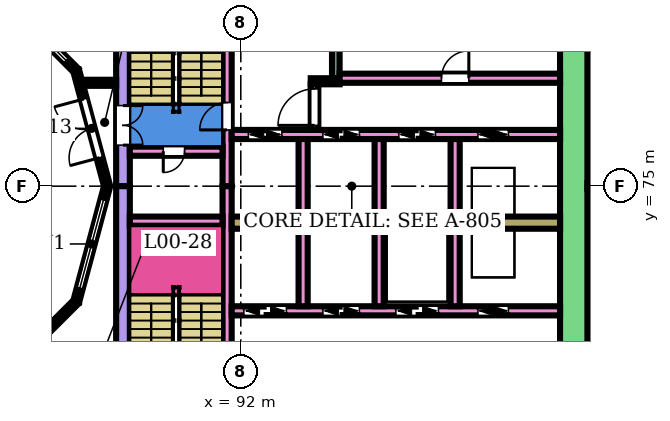
"""IFC4 building model, lengths in metres.
Left out: names, types, materials, properties, quantities, classifications, styles, units other than length and angle.
Written with IfcOpenShell. Run it as: python <this file> out.ifc"""

import sys

from ifc_helpers import new_model, si_unit, direction, frame, frame_2d, origin, place, context, subcontext, project, spatial, rectangle, extrude, element, fill, save


model = new_model("IFC4")
c1 = context("Model", 3, precision=1e-05, world=origin(), true_north=direction((0.0, 1.0)))
c2 = subcontext(c1, "Body", "Model", "MODEL_VIEW")
j1 = project(units=[si_unit("LENGTHUNIT", "METRE"), si_unit("PLANEANGLEUNIT", "RADIAN")], contexts=[c1])
p1 = place(None, origin())
s1 = spatial("IfcSite", under=j1, at=p1, CompositionType="ELEMENT")
p2 = place(p1, origin())
s2 = spatial("IfcBuilding", under=s1, at=p2, CompositionType="ELEMENT")
p3 = place(p2, origin())
s3 = spatial("IfcBuildingStorey", under=s2, at=p3, CompositionType="ELEMENT", Elevation=0.0)
p4 = place(p3, frame((88.125, 75.0, 0.0), z_axis=(0.0, 0.0, 1.0), x_axis=(0.0, 1.0, 0.0)))
e1 = element("IfcWall", 1, at=p4, inside=s3, PredefinedType="SHEAR", context=c2, shape_type="SweptSolid", body=[
    extrude(rectangle(XDim=7.5, YDim=0.45, at=frame_2d((3.75, 0.0))), origin(), (0.0, 0.0, 1.0), 6.55),
])
p5 = place(p4, frame((1.35, 0.0, 0.0)))
e2 = element("IfcOpeningElement", 2, at=p5, cuts=e1, PredefinedType="OPENING", context=c2, shape_type="SweptSolid", body=[
    extrude(rectangle(XDim=1.3, YDim=2.4, at=frame_2d((0.65, 1.2))), frame((0.0, 0.235, 0.0), z_axis=(0.0, -1.0, 0.0), x_axis=(1.0, 0.0, 0.0)), (0.0, 0.0, 1.0), 0.47),
])
p6 = place(p3, frame((88.125, 67.5, 0.0), z_axis=(0.0, 0.0, 1.0), x_axis=(0.0, 1.0, 0.0)))
e3 = element("IfcWall", 3, at=p6, inside=s3, PredefinedType="SHEAR", context=c2, shape_type="SweptSolid", body=[
    extrude(rectangle(XDim=7.5, YDim=0.45, at=frame_2d((3.75, 0.0))), origin(), (0.0, 0.0, 1.0), 6.55),
])
p7 = place(p6, frame((0.05, 0.0, 0.0)))
e4 = element("IfcOpeningElement", 4, at=p7, cuts=e3, PredefinedType="OPENING", context=c2, shape_type="SweptSolid", body=[
    extrude(rectangle(XDim=1.3, YDim=2.4, at=frame_2d((0.65, 1.2))), frame((0.0, 0.235, 0.0), z_axis=(0.0, -1.0, 0.0), x_axis=(1.0, 0.0, 0.0)), (0.0, 0.0, 1.0), 0.47),
])
p8 = place(p3, frame((102.95, 66.6, 0.0), z_axis=(0.0, 0.0, 1.0), x_axis=(0.0, 1.0, 0.0)))
e5 = element("IfcWall", 5, at=p8, inside=s3, PredefinedType="SHEAR", context=c2, shape_type="SweptSolid", body=[
    extrude(rectangle(XDim=16.8, YDim=0.9, at=frame_2d((8.4, 0.0))), origin(), (0.0, 0.0, 1.0), 6.55),
])
p9 = place(p3, frame((91.55, 75.0, 0.0), z_axis=(0.0, 0.0, 1.0), x_axis=(0.0, 1.0, 0.0)))
e6 = element("IfcWall", 6, at=p9, inside=s3, PredefinedType="SHEAR", context=c2, shape_type="SweptSolid", body=[
    extrude(rectangle(XDim=7.5, YDim=0.3, at=frame_2d((3.75, 0.0))), origin(), (0.0, 0.0, 1.0), 6.55),
])
p10 = place(p9, frame((1.85, 0.0, 0.0)))
e7 = element("IfcOpeningElement", 7, at=p10, cuts=e6, PredefinedType="OPENING", context=c2, shape_type="SweptSolid", body=[
    extrude(rectangle(XDim=0.9, YDim=2.1, at=frame_2d((0.45, 1.05))), frame((0.0, 0.16, 0.0), z_axis=(0.0, -1.0, 0.0), x_axis=(1.0, 0.0, 0.0)), (0.0, 0.0, 1.0), 0.32),
])
p11 = place(p3, frame((91.55, 67.5, 0.0), z_axis=(0.0, 0.0, 1.0), x_axis=(0.0, 1.0, 0.0)))
e8 = element("IfcWall", 8, at=p11, inside=s3, PredefinedType="SHEAR", context=c2, shape_type="SweptSolid", body=[
    extrude(rectangle(XDim=7.5, YDim=0.3, at=frame_2d((3.75, 0.0))), origin(), (0.0, 0.0, 1.0), 6.55),
])
p12 = place(p11, frame((0.15, 0.0, 0.0)))
e9 = element("IfcOpeningElement", 9, at=p12, cuts=e8, PredefinedType="OPENING", context=c2, shape_type="SweptSolid", body=[
    extrude(rectangle(XDim=0.9, YDim=2.1, at=frame_2d((0.45, 1.05))), frame((0.0, 0.16, 0.0), z_axis=(0.0, -1.0, 0.0), x_axis=(1.0, 0.0, 0.0)), (0.0, 0.0, 1.0), 0.32),
])
p13 = place(p3, frame((88.35, 76.15, 0.0), z_axis=(0.0, 0.0, 1.0), x_axis=(1.0, 0.0, 0.0)))
e10 = element("IfcWall", 10, at=p13, inside=s3, PredefinedType="SHEAR", context=c2, shape_type="SweptSolid", body=[
    extrude(rectangle(XDim=3.05, YDim=0.3, at=frame_2d((1.525, 0.0))), origin(), (0.0, 0.0, 1.0), 6.55),
])
p14 = place(p13, frame((1.1, 0.0, 0.0)))
e11 = element("IfcOpeningElement", 11, at=p14, cuts=e10, PredefinedType="OPENING", context=c2, shape_type="SweptSolid", body=[
    extrude(rectangle(XDim=0.7, YDim=2.0, at=frame_2d((0.35, 1.0))), frame((0.0, 0.16, 0.0), z_axis=(0.0, -1.0, 0.0), x_axis=(1.0, 0.0, 0.0)), (0.0, 0.0, 1.0), 0.32),
])
p15 = place(p3, frame((88.35, 73.85, 0.0), z_axis=(0.0, 0.0, 1.0), x_axis=(1.0, 0.0, 0.0)))
e12 = element("IfcWall", 12, at=p15, inside=s3, PredefinedType="SHEAR", context=c2, shape_type="SweptSolid", body=[
    extrude(rectangle(XDim=3.05, YDim=0.3, at=frame_2d((1.525, 0.0))), origin(), (0.0, 0.0, 1.0), 6.55),
])
p16 = place(p3, frame((91.7, 76.7, 0.0), z_axis=(0.0, 0.0, 1.0), x_axis=(1.0, 0.0, 0.0)))
e13 = element("IfcWall", 13, at=p16, inside=s3, PredefinedType="SHEAR", context=c2, shape_type="SweptSolid", body=[
    extrude(rectangle(XDim=10.8, YDim=0.3, at=frame_2d((5.4, 0.0))), origin(), (0.0, 0.0, 1.0), 6.55),
])
p17 = place(p16, frame((0.55, 0.0, 0.0)))
e14 = element("IfcOpeningElement", 14, at=p17, cuts=e13, PredefinedType="OPENING", context=c2, shape_type="SweptSolid", body=[
    extrude(rectangle(XDim=1.1, YDim=2.1, at=frame_2d((0.55, 1.05))), frame((0.0, 0.16, 0.0), z_axis=(0.0, -1.0, 0.0), x_axis=(1.0, 0.0, 0.0)), (0.0, 0.0, 1.0), 0.32),
])
p18 = place(p16, frame((3.0, 0.0, 0.0)))
e15 = element("IfcOpeningElement", 15, at=p18, cuts=e13, PredefinedType="OPENING", context=c2, shape_type="SweptSolid", body=[
    extrude(rectangle(XDim=1.2, YDim=2.1, at=frame_2d((0.6, 1.05))), frame((0.0, 0.16, 0.0), z_axis=(0.0, -1.0, 0.0), x_axis=(1.0, 0.0, 0.0)), (0.0, 0.0, 1.0), 0.32),
])
p19 = place(p16, frame((5.5, 0.0, 0.0)))
e16 = element("IfcOpeningElement", 16, at=p19, cuts=e13, PredefinedType="OPENING", context=c2, shape_type="SweptSolid", body=[
    extrude(rectangle(XDim=1.2, YDim=2.1, at=frame_2d((0.6, 1.05))), frame((0.0, 0.16, 0.0), z_axis=(0.0, -1.0, 0.0), x_axis=(1.0, 0.0, 0.0)), (0.0, 0.0, 1.0), 0.32),
])
p20 = place(p16, frame((8.1, 0.0, 0.0)))
e17 = element("IfcOpeningElement", 17, at=p20, cuts=e13, PredefinedType="OPENING", context=c2, shape_type="SweptSolid", body=[
    extrude(rectangle(XDim=1.0, YDim=2.1, at=frame_2d((0.5, 1.05))), frame((0.0, 0.16, 0.0), z_axis=(0.0, -1.0, 0.0), x_axis=(1.0, 0.0, 0.0)), (0.0, 0.0, 1.0), 0.32),
])
p21 = place(p3, frame((91.7, 73.8, 0.0), z_axis=(0.0, 0.0, 1.0), x_axis=(1.0, 0.0, 0.0)))
e18 = element("IfcWall", 18, at=p21, inside=s3, PredefinedType="SHEAR", context=c2, shape_type="SweptSolid", body=[
    extrude(rectangle(XDim=10.8, YDim=0.4, at=frame_2d((5.4, 0.0))), origin(), (0.0, 0.0, 1.0), 6.55),
])
p22 = place(p3, frame((91.7, 70.9, 0.0), z_axis=(0.0, 0.0, 1.0), x_axis=(1.0, 0.0, 0.0)))
e19 = element("IfcWall", 19, at=p22, inside=s3, PredefinedType="SHEAR", context=c2, shape_type="SweptSolid", body=[
    extrude(rectangle(XDim=10.8, YDim=0.3, at=frame_2d((5.4, 0.0))), origin(), (0.0, 0.0, 1.0), 6.55),
])
p23 = place(p22, frame((0.4, 0.0, 0.0)))
e20 = element("IfcOpeningElement", 20, at=p23, cuts=e19, PredefinedType="OPENING", context=c2, shape_type="SweptSolid", body=[
    extrude(rectangle(XDim=1.4, YDim=2.1, at=frame_2d((0.7, 1.05))), frame((0.0, 0.16, 0.0), z_axis=(0.0, -1.0, 0.0), x_axis=(1.0, 0.0, 0.0)), (0.0, 0.0, 1.0), 0.32),
])
p24 = place(p22, frame((3.0, 0.0, 0.0)))
e21 = element("IfcOpeningElement", 21, at=p24, cuts=e19, PredefinedType="OPENING", context=c2, shape_type="SweptSolid", body=[
    extrude(rectangle(XDim=1.2, YDim=2.1, at=frame_2d((0.6, 1.05))), frame((0.0, 0.16, 0.0), z_axis=(0.0, -1.0, 0.0), x_axis=(1.0, 0.0, 0.0)), (0.0, 0.0, 1.0), 0.32),
])
p25 = place(p22, frame((5.4, 0.0, 0.0)))
e22 = element("IfcOpeningElement", 22, at=p25, cuts=e19, PredefinedType="OPENING", context=c2, shape_type="SweptSolid", body=[
    extrude(rectangle(XDim=1.4, YDim=2.1, at=frame_2d((0.7, 1.05))), frame((0.0, 0.16, 0.0), z_axis=(0.0, -1.0, 0.0), x_axis=(1.0, 0.0, 0.0)), (0.0, 0.0, 1.0), 0.32),
])
p26 = place(p22, frame((8.1, 0.0, 0.0)))
e23 = element("IfcOpeningElement", 23, at=p26, cuts=e19, PredefinedType="OPENING", context=c2, shape_type="SweptSolid", body=[
    extrude(rectangle(XDim=1.0, YDim=2.1, at=frame_2d((0.5, 1.05))), frame((0.0, 0.16, 0.0), z_axis=(0.0, -1.0, 0.0), x_axis=(1.0, 0.0, 0.0)), (0.0, 0.0, 1.0), 0.32),
])
for number, where, z_axis, x_axis in (
    (24, (94.05, 74.0, 0.0), (0.0, 0.0, 1.0), (0.0, 1.0, 0.0)),
    (25, (96.55, 74.0, 0.0), (0.0, 0.0, 1.0), (0.0, 1.0, 0.0)),
    (26, (99.05, 74.0, 0.0), (0.0, 0.0, 1.0), (0.0, 1.0, 0.0)),
    (27, (94.05, 71.05, 0.0), (0.0, 0.0, 1.0), (0.0, 1.0, 0.0)),
    (28, (96.55, 71.05, 0.0), (0.0, 0.0, 1.0), (0.0, 1.0, 0.0)),
    (29, (99.05, 71.05, 0.0), (0.0, 0.0, 1.0), (0.0, 1.0, 0.0)),
):
    element("IfcWall", number, at=place(p3, frame(where, z_axis=z_axis, x_axis=x_axis)), inside=s3, PredefinedType="SHEAR", context=c2, shape_type="SweptSolid", body=[
        extrude(rectangle(XDim=2.55, YDim=0.3, at=frame_2d((1.275, 0.0))), origin(), (0.0, 0.0, 1.0), 6.55),
    ])
p27 = place(p3, frame((95.125, 78.55, 0.0), z_axis=(0.0, 0.0, 1.0), x_axis=(0.0, 1.0, 0.0)))
e30 = element("IfcWall", 30, at=p27, inside=s3, PredefinedType="SHEAR", context=c2, shape_type="SweptSolid", body=[
    extrude(rectangle(XDim=3.95, YDim=0.25, at=frame_2d((1.975, 0.0))), origin(), (0.0, 0.0, 1.0), 6.55),
])
p28 = place(p3, frame((94.3, 78.45, 0.0), z_axis=(0.0, 0.0, 1.0), x_axis=(1.0, 0.0, 0.0)))
e31 = element("IfcWall", 31, at=p28, inside=s3, PredefinedType="SHEAR", context=c2, shape_type="SweptSolid", body=[
    extrude(rectangle(XDim=0.95, YDim=0.2, at=frame_2d((0.475, 0.0))), origin(), (0.0, 0.0, 1.0), 6.55),
])
p29 = place(p3, frame((94.425, 76.85, 0.0), z_axis=(0.0, 0.0, 1.0), x_axis=(0.0, 1.0, 0.0)))
e32 = element("IfcWall", 32, at=p29, inside=s3, PredefinedType="SHEAR", context=c2, shape_type="SweptSolid", body=[
    extrude(rectangle(XDim=1.5, YDim=0.25, at=frame_2d((0.75, 0.0))), origin(), (0.0, 0.0, 1.0), 6.55),
])
p30 = place(p29, frame((0.15, 0.0, 0.0)))
e33 = element("IfcOpeningElement", 33, at=p30, cuts=e32, PredefinedType="OPENING", context=c2, shape_type="SweptSolid", body=[
    extrude(rectangle(XDim=1.2, YDim=2.1, at=frame_2d((0.6, 1.05))), frame((0.0, 0.135, 0.0), z_axis=(0.0, -1.0, 0.0), x_axis=(1.0, 0.0, 0.0)), (0.0, 0.0, 1.0), 0.27),
])
p31 = place(p3, frame((95.25, 78.55, 0.0), z_axis=(0.0, 0.0, 1.0), x_axis=(1.0, 0.0, 0.0)))
e34 = element("IfcWall", 34, at=p31, inside=s3, PredefinedType="SHEAR", context=c2, shape_type="SweptSolid", body=[
    extrude(rectangle(XDim=7.25, YDim=0.3, at=frame_2d((3.625, 0.0))), origin(), (0.0, 0.0, 1.0), 6.55),
])
p32 = place(p31, frame((3.35, 0.0, 0.0)))
e35 = element("IfcOpeningElement", 35, at=p32, cuts=e34, PredefinedType="OPENING", context=c2, shape_type="SweptSolid", body=[
    extrude(rectangle(XDim=0.9, YDim=2.1, at=frame_2d((0.45, 1.05))), frame((0.0, 0.16, 0.0), z_axis=(0.0, -1.0, 0.0), x_axis=(1.0, 0.0, 0.0)), (0.0, 0.0, 1.0), 0.32),
])
p33 = place(p3, frame((87.604, 75.0, 0.0), z_axis=(0.0, 0.0, 1.0), x_axis=(-0.258789828301, 0.965933654434, 0.0)))
e36 = element("IfcWall", 36, at=p33, inside=s3, PredefinedType="NOTDEFINED", context=c2, shape_type="SweptSolid", body=[
    extrude(rectangle(XDim=3.936, YDim=0.2, at=frame_2d((1.968, 0.0))), origin(), (0.0, 0.0, 1.0), 7.0),
])
p34 = place(p33, frame((0.968, 0.0, 0.0)))
e37 = element("IfcOpeningElement", 37, at=p34, cuts=e36, PredefinedType="OPENING", context=c2, shape_type="SweptSolid", body=[
    extrude(rectangle(XDim=2.0, YDim=2.4, at=frame_2d((1.0, 1.2))), frame((0.0, 0.11, 0.0), z_axis=(0.0, -1.0, 0.0), x_axis=(1.0, 0.0, 0.0)), (0.0, 0.0, 1.0), 0.22),
])
p35 = place(p3, frame((86.585, 78.802, 0.0), z_axis=(0.0, 0.0, 1.0), x_axis=(-0.707106781187, 0.707106781187, 0.0)))
e38 = element("IfcWall", 38, at=p35, inside=s3, PredefinedType="NOTDEFINED", context=c2, shape_type="SweptSolid", body=[
    extrude(rectangle(XDim=3.936, YDim=0.2, at=frame_2d((1.968, 0.0))), origin(), (0.0, 0.0, 1.0), 7.0),
])
p36 = place(p35, frame((0.468, 0.0, 0.9)))
e39 = element("IfcOpeningElement", 39, at=p36, cuts=e38, PredefinedType="OPENING", context=c2, shape_type="SweptSolid", body=[
    extrude(rectangle(XDim=3.0, YDim=2.3, at=frame_2d((1.5, 1.15))), frame((0.0, 0.11, 0.0), z_axis=(0.0, -1.0, 0.0), x_axis=(1.0, 0.0, 0.0)), (0.0, 0.0, 1.0), 0.22),
])
p37 = place(p3, frame((86.585, 71.198, 0.0), z_axis=(0.0, 0.0, 1.0), x_axis=(0.258789828301, 0.965933654434, 0.0)))
e40 = element("IfcWall", 40, at=p37, inside=s3, PredefinedType="NOTDEFINED", context=c2, shape_type="SweptSolid", body=[
    extrude(rectangle(XDim=3.936, YDim=0.2, at=frame_2d((1.968, 0.0))), origin(), (0.0, 0.0, 1.0), 7.0),
])
p38 = place(p37, frame((0.468, 0.0, 0.9)))
e41 = element("IfcOpeningElement", 41, at=p38, cuts=e40, PredefinedType="OPENING", context=c2, shape_type="SweptSolid", body=[
    extrude(rectangle(XDim=3.0, YDim=2.3, at=frame_2d((1.5, 1.15))), frame((0.0, 0.11, 0.0), z_axis=(0.0, -1.0, 0.0), x_axis=(1.0, 0.0, 0.0)), (0.0, 0.0, 1.0), 0.22),
])
p39 = place(p3, frame((83.802, 68.415, 0.0), z_axis=(0.0, 0.0, 1.0), x_axis=(0.707106781187, 0.707106781187, 0.0)))
e42 = element("IfcWall", 42, at=p39, inside=s3, PredefinedType="NOTDEFINED", context=c2, shape_type="SweptSolid", body=[
    extrude(rectangle(XDim=3.936, YDim=0.2, at=frame_2d((1.968, 0.0))), origin(), (0.0, 0.0, 1.0), 7.0),
])
p40 = place(p39, frame((0.26, 0.0, 0.0)))
e43 = element("IfcOpeningElement", 43, at=p40, cuts=e42, PredefinedType="OPENING", context=c2, shape_type="SweptSolid", body=[
    extrude(rectangle(XDim=1.3, YDim=2.4, at=frame_2d((0.65, 1.2))), frame((0.0, 0.11, 0.0), z_axis=(0.0, -1.0, 0.0), x_axis=(1.0, 0.0, 0.0)), (0.0, 0.0, 1.0), 0.22),
])
p41 = place(p3, frame((103.401, 75.0, 0.0), z_axis=(0.0, 0.0, 1.0), x_axis=(1.0, 0.0, 0.0)))
e44 = element("IfcWall", 44, at=p41, inside=s3, PredefinedType="PARTITIONING", context=c2, shape_type="SweptSolid", body=[
    extrude(rectangle(XDim=22.396, YDim=0.2, at=frame_2d((11.198, 0.0))), origin(), (0.0, 0.0, 1.0), 5.65),
])
p42 = place(p3, frame((86.796, 78.4, 0.0), z_axis=(0.0, 0.0, 1.0), x_axis=(1.0, 0.0, 0.0)))
e45 = element("IfcWall", 45, at=p42, inside=s3, PredefinedType="PARTITIONING", context=c2, shape_type="SweptSolid", body=[
    extrude(rectangle(XDim=1.104, YDim=0.2, at=frame_2d((0.552, 0.0))), origin(), (0.0, 0.0, 1.0), 6.55),
])
p43 = place(p34, origin())
e46 = element("IfcDoor", 46, at=p43, inside=s3, OperationType="DOUBLE_DOOR_SINGLE_SWING", PredefinedType="DOOR", context=c2, shape_type="SweptSolid", body=[
    extrude(rectangle(XDim=2.0, YDim=2.4, at=frame_2d((1.0, 1.2))), frame((0.0, 0.025, 0.0), z_axis=(0.0, -1.0, 0.0), x_axis=(1.0, 0.0, 0.0)), (0.0, 0.0, 1.0), 0.05),
])
fill(e37, e46)
p44 = place(p36, origin())
e47 = element("IfcWindow", 47, at=p44, inside=s3, PartitioningType="SINGLE_PANEL", PredefinedType="WINDOW", context=c2, shape_type="SweptSolid", body=[
    extrude(rectangle(XDim=3.0, YDim=2.3, at=frame_2d((1.5, 1.15))), frame((0.0, 0.03, 0.0), z_axis=(0.0, -1.0, 0.0), x_axis=(1.0, 0.0, 0.0)), (0.0, 0.0, 1.0), 0.06),
])
fill(e39, e47)
p45 = place(p38, origin())
e48 = element("IfcWindow", 48, at=p45, inside=s3, PartitioningType="SINGLE_PANEL", PredefinedType="WINDOW", context=c2, shape_type="SweptSolid", body=[
    extrude(rectangle(XDim=3.0, YDim=2.3, at=frame_2d((1.5, 1.15))), frame((0.0, 0.03, 0.0), z_axis=(0.0, -1.0, 0.0), x_axis=(1.0, 0.0, 0.0)), (0.0, 0.0, 1.0), 0.06),
])
fill(e41, e48)
p46 = place(p14, frame((0.7, 0.0, 0.0), z_axis=(0.0, 0.0, 1.0), x_axis=(-1.0, 0.0, 0.0)))
e49 = element("IfcDoor", 49, at=p46, inside=s3, OperationType="SINGLE_SWING_RIGHT", PredefinedType="DOOR", context=c2, shape_type="SweptSolid", body=[
    extrude(rectangle(XDim=0.7, YDim=2.0, at=frame_2d((0.35, 1.0))), frame((0.0, 0.025, 0.0), z_axis=(0.0, -1.0, 0.0), x_axis=(1.0, 0.0, 0.0)), (0.0, 0.0, 1.0), 0.05),
])
fill(e11, e49)
p47 = place(p10, origin())
e50 = element("IfcDoor", 50, at=p47, inside=s3, OperationType="SINGLE_SWING_LEFT", PredefinedType="DOOR", context=c2, shape_type="SweptSolid", body=[
    extrude(rectangle(XDim=0.9, YDim=2.1, at=frame_2d((0.45, 1.05))), frame((0.0, 0.025, 0.0), z_axis=(0.0, -1.0, 0.0), x_axis=(1.0, 0.0, 0.0)), (0.0, 0.0, 1.0), 0.05),
])
fill(e7, e50)
p48 = place(p5, frame((1.3, 0.0, 0.0), z_axis=(0.0, 0.0, 1.0), x_axis=(-1.0, 0.0, 0.0)))
e51 = element("IfcDoor", 51, at=p48, inside=s3, OperationType="DOUBLE_DOOR_SINGLE_SWING", PredefinedType="DOOR", context=c2, shape_type="SweptSolid", body=[
    extrude(rectangle(XDim=1.3, YDim=2.4, at=frame_2d((0.65, 1.2))), frame((0.0, 0.025, 0.0), z_axis=(0.0, -1.0, 0.0), x_axis=(1.0, 0.0, 0.0)), (0.0, 0.0, 1.0), 0.05),
])
fill(e2, e51)
p49 = place(p17, origin())
e52 = element("IfcDoor", 52, at=p49, inside=s3, OperationType="DOUBLE_DOOR_SLIDING", PredefinedType="DOOR", context=c2, shape_type="SweptSolid", body=[
    extrude(rectangle(XDim=1.1, YDim=2.1, at=frame_2d((0.55, 1.05))), frame((0.0, 0.025, 0.0), z_axis=(0.0, -1.0, 0.0), x_axis=(1.0, 0.0, 0.0)), (0.0, 0.0, 1.0), 0.05),
])
fill(e14, e52)
p50 = place(p18, origin())
e53 = element("IfcDoor", 53, at=p50, inside=s3, OperationType="DOUBLE_DOOR_SLIDING", PredefinedType="DOOR", context=c2, shape_type="SweptSolid", body=[
    extrude(rectangle(XDim=1.2, YDim=2.1, at=frame_2d((0.6, 1.05))), frame((0.0, 0.025, 0.0), z_axis=(0.0, -1.0, 0.0), x_axis=(1.0, 0.0, 0.0)), (0.0, 0.0, 1.0), 0.05),
])
fill(e15, e53)
p51 = place(p19, origin())
e54 = element("IfcDoor", 54, at=p51, inside=s3, OperationType="DOUBLE_DOOR_SLIDING", PredefinedType="DOOR", context=c2, shape_type="SweptSolid", body=[
    extrude(rectangle(XDim=1.2, YDim=2.1, at=frame_2d((0.6, 1.05))), frame((0.0, 0.025, 0.0), z_axis=(0.0, -1.0, 0.0), x_axis=(1.0, 0.0, 0.0)), (0.0, 0.0, 1.0), 0.05),
])
fill(e16, e54)
p52 = place(p20, origin())
e55 = element("IfcDoor", 55, at=p52, inside=s3, OperationType="DOUBLE_DOOR_SLIDING", PredefinedType="DOOR", context=c2, shape_type="SweptSolid", body=[
    extrude(rectangle(XDim=1.0, YDim=2.1, at=frame_2d((0.5, 1.05))), frame((0.0, 0.025, 0.0), z_axis=(0.0, -1.0, 0.0), x_axis=(1.0, 0.0, 0.0)), (0.0, 0.0, 1.0), 0.05),
])
fill(e17, e55)
p53 = place(p23, origin())
e56 = element("IfcDoor", 56, at=p53, inside=s3, OperationType="DOUBLE_DOOR_SLIDING", PredefinedType="DOOR", context=c2, shape_type="SweptSolid", body=[
    extrude(rectangle(XDim=1.4, YDim=2.1, at=frame_2d((0.7, 1.05))), frame((0.0, 0.025, 0.0), z_axis=(0.0, -1.0, 0.0), x_axis=(1.0, 0.0, 0.0)), (0.0, 0.0, 1.0), 0.05),
])
fill(e20, e56)
p54 = place(p24, origin())
e57 = element("IfcDoor", 57, at=p54, inside=s3, OperationType="DOUBLE_DOOR_SLIDING", PredefinedType="DOOR", context=c2, shape_type="SweptSolid", body=[
    extrude(rectangle(XDim=1.2, YDim=2.1, at=frame_2d((0.6, 1.05))), frame((0.0, 0.025, 0.0), z_axis=(0.0, -1.0, 0.0), x_axis=(1.0, 0.0, 0.0)), (0.0, 0.0, 1.0), 0.05),
])
fill(e21, e57)
p55 = place(p25, origin())
e58 = element("IfcDoor", 58, at=p55, inside=s3, OperationType="DOUBLE_DOOR_SLIDING", PredefinedType="DOOR", context=c2, shape_type="SweptSolid", body=[
    extrude(rectangle(XDim=1.4, YDim=2.1, at=frame_2d((0.7, 1.05))), frame((0.0, 0.025, 0.0), z_axis=(0.0, -1.0, 0.0), x_axis=(1.0, 0.0, 0.0)), (0.0, 0.0, 1.0), 0.05),
])
fill(e22, e58)
p56 = place(p26, origin())
e59 = element("IfcDoor", 59, at=p56, inside=s3, OperationType="DOUBLE_DOOR_SLIDING", PredefinedType="DOOR", context=c2, shape_type="SweptSolid", body=[
    extrude(rectangle(XDim=1.0, YDim=2.1, at=frame_2d((0.5, 1.05))), frame((0.0, 0.025, 0.0), z_axis=(0.0, -1.0, 0.0), x_axis=(1.0, 0.0, 0.0)), (0.0, 0.0, 1.0), 0.05),
])
fill(e23, e59)
p57 = place(p30, origin())
e60 = element("IfcDoor", 60, at=p57, inside=s3, OperationType="SINGLE_SWING_LEFT", PredefinedType="DOOR", context=c2, shape_type="SweptSolid", body=[
    extrude(rectangle(XDim=1.2, YDim=2.1, at=frame_2d((0.6, 1.05))), frame((0.0, 0.025, 0.0), z_axis=(0.0, -1.0, 0.0), x_axis=(1.0, 0.0, 0.0)), (0.0, 0.0, 1.0), 0.05),
])
fill(e33, e60)
p58 = place(p32, origin())
e61 = element("IfcDoor", 61, at=p58, inside=s3, OperationType="SINGLE_SWING_RIGHT", PredefinedType="DOOR", context=c2, shape_type="SweptSolid", body=[
    extrude(rectangle(XDim=0.9, YDim=2.1, at=frame_2d((0.45, 1.05))), frame((0.0, 0.025, 0.0), z_axis=(0.0, -1.0, 0.0), x_axis=(1.0, 0.0, 0.0)), (0.0, 0.0, 1.0), 0.05),
])
fill(e35, e61)
save(model, sys.argv[1])
